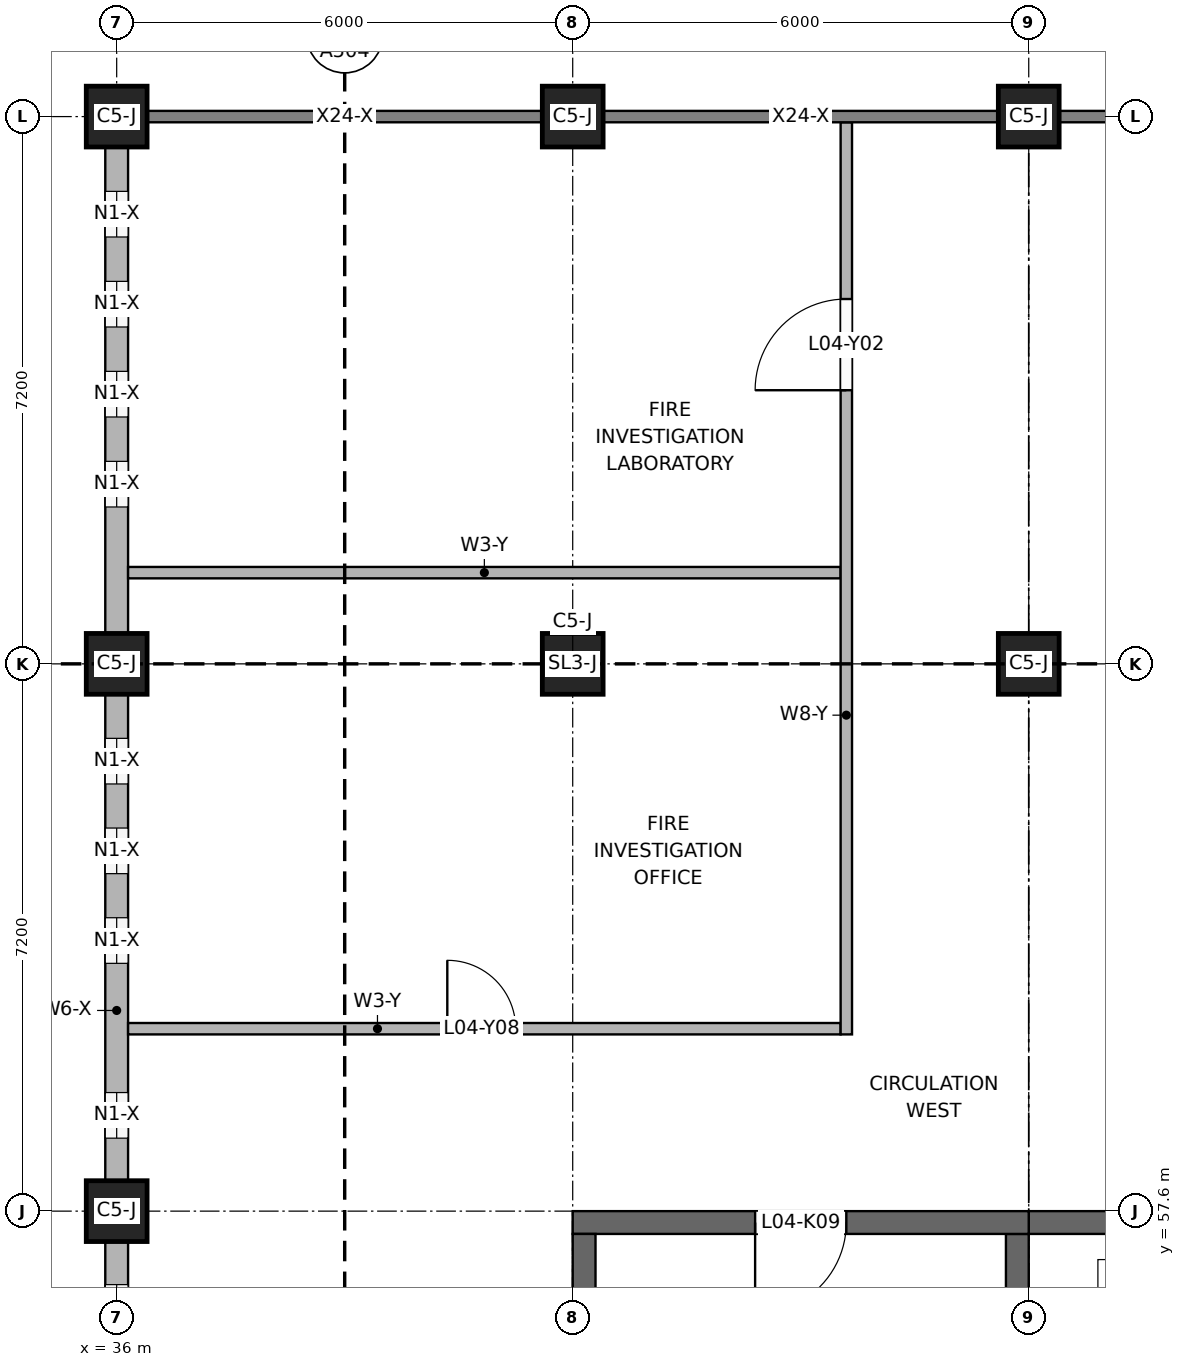
"""IFC4 building model, lengths in metres.
Left out: names, types, materials, properties, quantities, classifications, styles, units other than length and angle.
Written with IfcOpenShell. Run it as: python <this file> out.ifc"""

import sys

from ifc_helpers import new_model, si_unit, direction, frame, frame_2d, origin, origin_2d, place, context, subcontext, project, spatial, rectangle, extrude, element, fill, save


model = new_model("IFC4")
c1 = context("Model", 3, precision=1e-05, world=origin(), true_north=direction((0.0, 1.0)))
c2 = subcontext(c1, "Body", "Model", "MODEL_VIEW")
j1 = project(units=[si_unit("LENGTHUNIT", "METRE"), si_unit("PLANEANGLEUNIT", "RADIAN")], contexts=[c1])
p1 = place(None, origin())
s1 = spatial("IfcSite", under=j1, at=p1, CompositionType="ELEMENT")
p2 = place(p1, origin())
s2 = spatial("IfcBuilding", under=s1, at=p2, CompositionType="ELEMENT")
p3 = place(p2, frame((0.0, 0.0, 16.8)))
s3 = spatial("IfcBuildingStorey", under=s2, at=p3, CompositionType="ELEMENT", Elevation=16.8)
p4 = place(p3, frame((42.0, 57.45, 0.0), z_axis=(0.0, 0.0, 1.0), x_axis=(1.0, 0.0, 0.0)))
e1 = element("IfcWall", 1, at=p4, inside=s3, PredefinedType="SHEAR", context=c2, shape_type="SweptSolid", body=[
    extrude(rectangle(XDim=6.0, YDim=0.3, at=frame_2d((3.0, 0.0))), origin(), (0.0, 0.0, 1.0), 4.0),
])
p5 = place(p4, frame((2.4, 0.0, 0.0)))
e2 = element("IfcOpeningElement", 2, at=p5, cuts=e1, PredefinedType="OPENING", context=c2, shape_type="SweptSolid", body=[
    extrude(rectangle(XDim=1.2, YDim=2.1, at=frame_2d((0.6, 1.05))), frame((0.0, 0.16, 0.0), z_axis=(0.0, -1.0, 0.0), x_axis=(1.0, 0.0, 0.0)), (0.0, 0.0, 1.0), 0.32),
])
for number, where, z_axis, x_axis in (
    (3, (42.15, 50.7, 0.0), (0.0, 0.0, 1.0), (0.0, 1.0, 0.0)),
    (4, (47.85, 50.7, 0.0), (0.0, 0.0, 1.0), (0.0, 1.0, 0.0)),
):
    element("IfcWall", number, at=place(p3, frame(where, z_axis=z_axis, x_axis=x_axis)), inside=s3, PredefinedType="SHEAR", context=c2, shape_type="SweptSolid", body=[
        extrude(rectangle(XDim=6.6, YDim=0.3, at=frame_2d((3.3, 0.0))), origin(), (0.0, 0.0, 1.0), 4.0),
    ])
p6 = place(p3, frame((48.0, 57.45, 0.0), z_axis=(0.0, 0.0, 1.0), x_axis=(1.0, 0.0, 0.0)))
e5 = element("IfcWall", 5, at=p6, inside=s3, PredefinedType="SHEAR", context=c2, shape_type="SweptSolid", body=[
    extrude(rectangle(XDim=3.0, YDim=0.3, at=frame_2d((1.5, 0.0))), origin(), (0.0, 0.0, 1.0), 4.2),
])
for number, where, z_axis, x_axis in (
    (6, (36.0, 57.6, 0.0), (0.0, 0.0, 1.0), (1.0, 0.0, 0.0)),
    (7, (36.0, 64.8, 0.0), (0.0, 0.0, 1.0), (1.0, 0.0, 0.0)),
    (8, (42.0, 64.8, 0.0), (0.0, 0.0, 1.0), (1.0, 0.0, 0.0)),
    (9, (48.0, 64.8, 0.0), (0.0, 0.0, 1.0), (1.0, 0.0, 0.0)),
    (10, (36.0, 72.0, 0.0), (0.0, 0.0, 1.0), (1.0, 0.0, 0.0)),
    (11, (42.0, 72.0, 0.0), (0.0, 0.0, 1.0), (1.0, 0.0, 0.0)),
    (12, (48.0, 72.0, 0.0), (0.0, 0.0, 1.0), (1.0, 0.0, 0.0)),
):
    element("IfcColumn", number, at=place(p3, frame(where, z_axis=z_axis, x_axis=x_axis)), inside=s3, PredefinedType="COLUMN", context=c2, shape_type="SweptSolid", body=[
        extrude(rectangle(XDim=0.8, YDim=0.8, at=origin_2d()), origin(), (0.0, 0.0, 1.0), 4.0),
    ])
p7 = place(p3, frame((36.0, 50.8, 0.0), z_axis=(0.0, 0.0, 1.0), x_axis=(0.0, 1.0, 0.0)))
e13 = element("IfcWall", 13, at=p7, inside=s3, PredefinedType="SOLIDWALL", context=c2, shape_type="SweptSolid", body=[
    extrude(rectangle(XDim=6.4, YDim=0.3, at=frame_2d((3.2, 0.0))), origin(), (0.0, 0.0, 1.0), 3.1),
])
p8 = place(p7, frame((0.567, 0.0, 0.9)))
e14 = element("IfcOpeningElement", 14, at=p8, cuts=e13, PredefinedType="OPENING", context=c2, shape_type="SweptSolid", body=[
    extrude(rectangle(XDim=0.6, YDim=1.9, at=frame_2d((0.3, 0.95))), frame((0.0, 0.16, 0.0), z_axis=(0.0, -1.0, 0.0), x_axis=(1.0, 0.0, 0.0)), (0.0, 0.0, 1.0), 0.32),
])
p9 = place(p7, frame((1.733, 0.0, 0.9)))
e15 = element("IfcOpeningElement", 15, at=p9, cuts=e13, PredefinedType="OPENING", context=c2, shape_type="SweptSolid", body=[
    extrude(rectangle(XDim=0.6, YDim=1.9, at=frame_2d((0.3, 0.95))), frame((0.0, 0.16, 0.0), z_axis=(0.0, -1.0, 0.0), x_axis=(1.0, 0.0, 0.0)), (0.0, 0.0, 1.0), 0.32),
])
p10 = place(p7, frame((2.9, 0.0, 0.9)))
e16 = element("IfcOpeningElement", 16, at=p10, cuts=e13, PredefinedType="OPENING", context=c2, shape_type="SweptSolid", body=[
    extrude(rectangle(XDim=0.6, YDim=1.9, at=frame_2d((0.3, 0.95))), frame((0.0, 0.16, 0.0), z_axis=(0.0, -1.0, 0.0), x_axis=(1.0, 0.0, 0.0)), (0.0, 0.0, 1.0), 0.32),
])
p11 = place(p7, frame((4.067, 0.0, 0.9)))
e17 = element("IfcOpeningElement", 17, at=p11, cuts=e13, PredefinedType="OPENING", context=c2, shape_type="SweptSolid", body=[
    extrude(rectangle(XDim=0.6, YDim=1.9, at=frame_2d((0.3, 0.95))), frame((0.0, 0.16, 0.0), z_axis=(0.0, -1.0, 0.0), x_axis=(1.0, 0.0, 0.0)), (0.0, 0.0, 1.0), 0.32),
])
p12 = place(p7, frame((5.233, 0.0, 0.9)))
e18 = element("IfcOpeningElement", 18, at=p12, cuts=e13, PredefinedType="OPENING", context=c2, shape_type="SweptSolid", body=[
    extrude(rectangle(XDim=0.6, YDim=1.9, at=frame_2d((0.3, 0.95))), frame((0.0, 0.16, 0.0), z_axis=(0.0, -1.0, 0.0), x_axis=(1.0, 0.0, 0.0)), (0.0, 0.0, 1.0), 0.32),
])
p13 = place(p3, frame((36.0, 58.0, 0.0), z_axis=(0.0, 0.0, 1.0), x_axis=(0.0, 1.0, 0.0)))
e19 = element("IfcWall", 19, at=p13, inside=s3, PredefinedType="SOLIDWALL", context=c2, shape_type="SweptSolid", body=[
    extrude(rectangle(XDim=6.4, YDim=0.3, at=frame_2d((3.2, 0.0))), origin(), (0.0, 0.0, 1.0), 3.1),
])
p14 = place(p13, frame((0.56, 0.0, 0.9)))
e20 = element("IfcOpeningElement", 20, at=p14, cuts=e19, PredefinedType="OPENING", context=c2, shape_type="SweptSolid", body=[
    extrude(rectangle(XDim=0.6, YDim=1.9, at=frame_2d((0.3, 0.95))), frame((0.0, 0.16, 0.0), z_axis=(0.0, -1.0, 0.0), x_axis=(1.0, 0.0, 0.0)), (0.0, 0.0, 1.0), 0.32),
])
p15 = place(p13, frame((2.86, 0.0, 0.9)))
e21 = element("IfcOpeningElement", 21, at=p15, cuts=e19, PredefinedType="OPENING", context=c2, shape_type="SweptSolid", body=[
    extrude(rectangle(XDim=0.6, YDim=1.9, at=frame_2d((0.3, 0.95))), frame((0.0, 0.16, 0.0), z_axis=(0.0, -1.0, 0.0), x_axis=(1.0, 0.0, 0.0)), (0.0, 0.0, 1.0), 0.32),
])
p16 = place(p13, frame((4.04, 0.0, 0.9)))
e22 = element("IfcOpeningElement", 22, at=p16, cuts=e19, PredefinedType="OPENING", context=c2, shape_type="SweptSolid", body=[
    extrude(rectangle(XDim=0.6, YDim=1.9, at=frame_2d((0.3, 0.95))), frame((0.0, 0.16, 0.0), z_axis=(0.0, -1.0, 0.0), x_axis=(1.0, 0.0, 0.0)), (0.0, 0.0, 1.0), 0.32),
])
p17 = place(p13, frame((5.22, 0.0, 0.9)))
e23 = element("IfcOpeningElement", 23, at=p17, cuts=e19, PredefinedType="OPENING", context=c2, shape_type="SweptSolid", body=[
    extrude(rectangle(XDim=0.6, YDim=1.9, at=frame_2d((0.3, 0.95))), frame((0.0, 0.16, 0.0), z_axis=(0.0, -1.0, 0.0), x_axis=(1.0, 0.0, 0.0)), (0.0, 0.0, 1.0), 0.32),
])
p18 = place(p3, frame((36.0, 65.2, 0.0), z_axis=(0.0, 0.0, 1.0), x_axis=(0.0, 1.0, 0.0)))
e24 = element("IfcWall", 24, at=p18, inside=s3, PredefinedType="SOLIDWALL", context=c2, shape_type="SweptSolid", body=[
    extrude(rectangle(XDim=6.4, YDim=0.3, at=frame_2d((3.2, 0.0))), origin(), (0.0, 0.0, 1.0), 3.1),
])
p19 = place(p18, frame((1.664, 0.0, 0.9)))
e25 = element("IfcOpeningElement", 25, at=p19, cuts=e24, PredefinedType="OPENING", context=c2, shape_type="SweptSolid", body=[
    extrude(rectangle(XDim=0.6, YDim=1.9, at=frame_2d((0.3, 0.95))), frame((0.0, 0.16, 0.0), z_axis=(0.0, -1.0, 0.0), x_axis=(1.0, 0.0, 0.0)), (0.0, 0.0, 1.0), 0.32),
])
p20 = place(p18, frame((2.848, 0.0, 0.9)))
e26 = element("IfcOpeningElement", 26, at=p20, cuts=e24, PredefinedType="OPENING", context=c2, shape_type="SweptSolid", body=[
    extrude(rectangle(XDim=0.6, YDim=1.9, at=frame_2d((0.3, 0.95))), frame((0.0, 0.16, 0.0), z_axis=(0.0, -1.0, 0.0), x_axis=(1.0, 0.0, 0.0)), (0.0, 0.0, 1.0), 0.32),
])
p21 = place(p18, frame((4.032, 0.0, 0.9)))
e27 = element("IfcOpeningElement", 27, at=p21, cuts=e24, PredefinedType="OPENING", context=c2, shape_type="SweptSolid", body=[
    extrude(rectangle(XDim=0.6, YDim=1.9, at=frame_2d((0.3, 0.95))), frame((0.0, 0.16, 0.0), z_axis=(0.0, -1.0, 0.0), x_axis=(1.0, 0.0, 0.0)), (0.0, 0.0, 1.0), 0.32),
])
p22 = place(p18, frame((5.216, 0.0, 0.9)))
e28 = element("IfcOpeningElement", 28, at=p22, cuts=e24, PredefinedType="OPENING", context=c2, shape_type="SweptSolid", body=[
    extrude(rectangle(XDim=0.6, YDim=1.9, at=frame_2d((0.3, 0.95))), frame((0.0, 0.16, 0.0), z_axis=(0.0, -1.0, 0.0), x_axis=(1.0, 0.0, 0.0)), (0.0, 0.0, 1.0), 0.32),
])
p23 = place(p2, frame((0.0, 0.0, 12.6)))
s4 = spatial("IfcBuildingStorey", under=s2, at=p23, CompositionType="ELEMENT", Elevation=12.6)
p24 = place(p23, frame((48.0, 57.6, 0.0), z_axis=(0.0, 0.0, 1.0), x_axis=(0.0, 1.0, 0.0)))
e29 = element("IfcWall", 29, at=p24, inside=s4, PredefinedType="PARTITIONING", context=c2, shape_type="SweptSolid", body=[
    extrude(rectangle(XDim=6.7, YDim=0.2, at=frame_2d((3.35, 0.0))), origin(), (0.0, 0.0, 1.0), 8.2),
])
p25 = place(p3, frame((45.6, 59.925, 0.0), z_axis=(0.0, 0.0, 1.0), x_axis=(0.0, 1.0, 0.0)))
e30 = element("IfcWall", 30, at=p25, inside=s3, PredefinedType="PARTITIONING", context=c2, shape_type="SweptSolid", body=[
    extrude(rectangle(XDim=12.0, YDim=0.15, at=frame_2d((6.0, 0.0))), origin(), (0.0, 0.0, 1.0), 3.2),
])
p26 = place(p25, frame((8.475, 0.0, 0.0)))
e31 = element("IfcOpeningElement", 31, at=p26, cuts=e30, PredefinedType="OPENING", context=c2, shape_type="SweptSolid", body=[
    extrude(rectangle(XDim=1.2, YDim=2.1, at=frame_2d((0.6, 1.05))), frame((0.0, 0.085, 0.0), z_axis=(0.0, -1.0, 0.0), x_axis=(1.0, 0.0, 0.0)), (0.0, 0.0, 1.0), 0.17),
])
p27 = place(p3, frame((36.15, 60.0, 0.0), z_axis=(0.0, 0.0, 1.0), x_axis=(1.0, 0.0, 0.0)))
e32 = element("IfcWall", 32, at=p27, inside=s3, PredefinedType="PARTITIONING", context=c2, shape_type="SweptSolid", body=[
    extrude(rectangle(XDim=9.375, YDim=0.15, at=frame_2d((4.688, 0.0))), origin(), (0.0, 0.0, 1.0), 3.1),
])
p28 = place(p27, frame((4.2, 0.0, 0.0)))
e33 = element("IfcOpeningElement", 33, at=p28, cuts=e32, PredefinedType="OPENING", context=c2, shape_type="SweptSolid", body=[
    extrude(rectangle(XDim=0.9, YDim=2.1, at=frame_2d((0.45, 1.05))), frame((0.0, 0.085, 0.0), z_axis=(0.0, -1.0, 0.0), x_axis=(1.0, 0.0, 0.0)), (0.0, 0.0, 1.0), 0.17),
])
p29 = place(p3, frame((36.15, 66.0, 0.0), z_axis=(0.0, 0.0, 1.0), x_axis=(1.0, 0.0, 0.0)))
e34 = element("IfcWall", 34, at=p29, inside=s3, PredefinedType="PARTITIONING", context=c2, shape_type="SweptSolid", body=[
    extrude(rectangle(XDim=9.375, YDim=0.15, at=frame_2d((4.688, 0.0))), origin(), (0.0, 0.0, 1.0), 3.1),
])
p30 = place(p12, origin())
e35 = element("IfcWindow", 35, at=p30, inside=s3, PartitioningType="SINGLE_PANEL", PredefinedType="WINDOW", context=c2, shape_type="SweptSolid", body=[
    extrude(rectangle(XDim=0.6, YDim=1.9, at=frame_2d((0.3, 0.95))), frame((0.0, 0.03, 0.0), z_axis=(0.0, -1.0, 0.0), x_axis=(1.0, 0.0, 0.0)), (0.0, 0.0, 1.0), 0.06),
])
fill(e18, e35)
p31 = place(p14, origin())
e36 = element("IfcWindow", 36, at=p31, inside=s3, PartitioningType="SINGLE_PANEL", PredefinedType="WINDOW", context=c2, shape_type="SweptSolid", body=[
    extrude(rectangle(XDim=0.6, YDim=1.9, at=frame_2d((0.3, 0.95))), frame((0.0, 0.03, 0.0), z_axis=(0.0, -1.0, 0.0), x_axis=(1.0, 0.0, 0.0)), (0.0, 0.0, 1.0), 0.06),
])
fill(e20, e36)
p32 = place(p15, origin())
e37 = element("IfcWindow", 37, at=p32, inside=s3, PartitioningType="SINGLE_PANEL", PredefinedType="WINDOW", context=c2, shape_type="SweptSolid", body=[
    extrude(rectangle(XDim=0.6, YDim=1.9, at=frame_2d((0.3, 0.95))), frame((0.0, 0.03, 0.0), z_axis=(0.0, -1.0, 0.0), x_axis=(1.0, 0.0, 0.0)), (0.0, 0.0, 1.0), 0.06),
])
fill(e21, e37)
p33 = place(p16, origin())
e38 = element("IfcWindow", 38, at=p33, inside=s3, PartitioningType="SINGLE_PANEL", PredefinedType="WINDOW", context=c2, shape_type="SweptSolid", body=[
    extrude(rectangle(XDim=0.6, YDim=1.9, at=frame_2d((0.3, 0.95))), frame((0.0, 0.03, 0.0), z_axis=(0.0, -1.0, 0.0), x_axis=(1.0, 0.0, 0.0)), (0.0, 0.0, 1.0), 0.06),
])
fill(e22, e38)
p34 = place(p17, origin())
e39 = element("IfcWindow", 39, at=p34, inside=s3, PartitioningType="SINGLE_PANEL", PredefinedType="WINDOW", context=c2, shape_type="SweptSolid", body=[
    extrude(rectangle(XDim=0.6, YDim=1.9, at=frame_2d((0.3, 0.95))), frame((0.0, 0.03, 0.0), z_axis=(0.0, -1.0, 0.0), x_axis=(1.0, 0.0, 0.0)), (0.0, 0.0, 1.0), 0.06),
])
fill(e23, e39)
p35 = place(p19, origin())
e40 = element("IfcWindow", 40, at=p35, inside=s3, PartitioningType="SINGLE_PANEL", PredefinedType="WINDOW", context=c2, shape_type="SweptSolid", body=[
    extrude(rectangle(XDim=0.6, YDim=1.9, at=frame_2d((0.3, 0.95))), frame((0.0, 0.03, 0.0), z_axis=(0.0, -1.0, 0.0), x_axis=(1.0, 0.0, 0.0)), (0.0, 0.0, 1.0), 0.06),
])
fill(e25, e40)
p36 = place(p20, origin())
e41 = element("IfcWindow", 41, at=p36, inside=s3, PartitioningType="SINGLE_PANEL", PredefinedType="WINDOW", context=c2, shape_type="SweptSolid", body=[
    extrude(rectangle(XDim=0.6, YDim=1.9, at=frame_2d((0.3, 0.95))), frame((0.0, 0.03, 0.0), z_axis=(0.0, -1.0, 0.0), x_axis=(1.0, 0.0, 0.0)), (0.0, 0.0, 1.0), 0.06),
])
fill(e26, e41)
p37 = place(p21, origin())
e42 = element("IfcWindow", 42, at=p37, inside=s3, PartitioningType="SINGLE_PANEL", PredefinedType="WINDOW", context=c2, shape_type="SweptSolid", body=[
    extrude(rectangle(XDim=0.6, YDim=1.9, at=frame_2d((0.3, 0.95))), frame((0.0, 0.03, 0.0), z_axis=(0.0, -1.0, 0.0), x_axis=(1.0, 0.0, 0.0)), (0.0, 0.0, 1.0), 0.06),
])
fill(e27, e42)
p38 = place(p22, origin())
e43 = element("IfcWindow", 43, at=p38, inside=s3, PartitioningType="SINGLE_PANEL", PredefinedType="WINDOW", context=c2, shape_type="SweptSolid", body=[
    extrude(rectangle(XDim=0.6, YDim=1.9, at=frame_2d((0.3, 0.95))), frame((0.0, 0.03, 0.0), z_axis=(0.0, -1.0, 0.0), x_axis=(1.0, 0.0, 0.0)), (0.0, 0.0, 1.0), 0.06),
])
fill(e28, e43)
p39 = place(p5, frame((1.2, 0.0, 0.0), z_axis=(0.0, 0.0, 1.0), x_axis=(-1.0, 0.0, 0.0)))
e44 = element("IfcDoor", 44, at=p39, inside=s3, OperationType="SINGLE_SWING_RIGHT", PredefinedType="DOOR", context=c2, shape_type="SweptSolid", body=[
    extrude(rectangle(XDim=1.2, YDim=2.1, at=frame_2d((0.6, 1.05))), frame((0.0, 0.025, 0.0), z_axis=(0.0, -1.0, 0.0), x_axis=(1.0, 0.0, 0.0)), (0.0, 0.0, 1.0), 0.05),
])
fill(e2, e44)
p40 = place(p26, origin())
e45 = element("IfcDoor", 45, at=p40, inside=s3, OperationType="SINGLE_SWING_LEFT", PredefinedType="DOOR", context=c2, shape_type="SweptSolid", body=[
    extrude(rectangle(XDim=1.2, YDim=2.1, at=frame_2d((0.6, 1.05))), frame((0.0, 0.025, 0.0), z_axis=(0.0, -1.0, 0.0), x_axis=(1.0, 0.0, 0.0)), (0.0, 0.0, 1.0), 0.05),
])
fill(e31, e45)
p41 = place(p28, origin())
e46 = element("IfcDoor", 46, at=p41, inside=s3, OperationType="SINGLE_SWING_LEFT", PredefinedType="DOOR", context=c2, shape_type="SweptSolid", body=[
    extrude(rectangle(XDim=0.9, YDim=2.1, at=frame_2d((0.45, 1.05))), frame((0.0, 0.025, 0.0), z_axis=(0.0, -1.0, 0.0), x_axis=(1.0, 0.0, 0.0)), (0.0, 0.0, 1.0), 0.05),
])
fill(e33, e46)
save(model, sys.argv[1])
